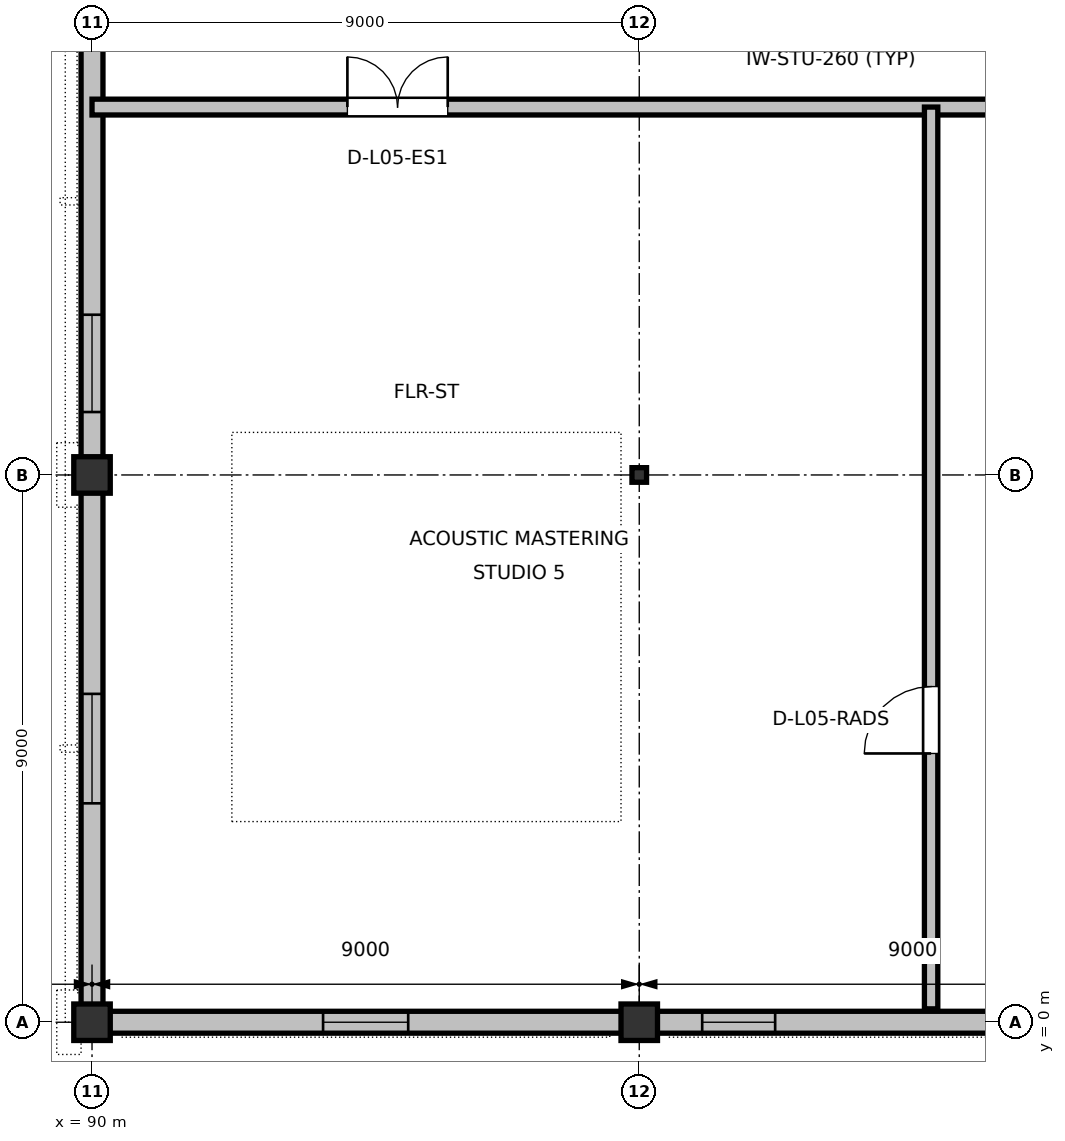
"""IFC4 building model, lengths in metres.
Left out: names, types, materials, properties, quantities, classifications, styles, units other than length and angle.
Written with IfcOpenShell. Run it as: python <this file> out.ifc"""

import sys

from ifc_helpers import new_model, si_unit, direction, frame, frame_2d, origin, origin_2d, place, context, subcontext, project, spatial, rectangle, i_section, extrude, element, fill, save


model = new_model("IFC4")
c1 = context("Model", 3, precision=1e-05, world=origin(), true_north=direction((0.0, 1.0)))
c2 = subcontext(c1, "Body", "Model", "MODEL_VIEW")
j1 = project(units=[si_unit("LENGTHUNIT", "METRE"), si_unit("PLANEANGLEUNIT", "RADIAN")], contexts=[c1])
p1 = place(None, origin())
s1 = spatial("IfcSite", under=j1, at=p1, CompositionType="ELEMENT")
p2 = place(p1, origin())
s2 = spatial("IfcBuilding", under=s1, at=p2, CompositionType="ELEMENT")
p3 = place(p2, frame((0.0, 0.0, 23.4)))
s3 = spatial("IfcBuildingStorey", under=s2, at=p3, CompositionType="ELEMENT", Elevation=23.4)
for number, where, z_axis, x_axis in (
    (1, (90.0, 0.0, 0.0), (0.0, 0.0, 1.0), (1.0, 0.0, 0.0)),
    (2, (90.0, 9.0, 0.0), (0.0, 0.0, 1.0), (1.0, 0.0, 0.0)),
    (3, (99.0, 0.0, 0.0), (0.0, 0.0, 1.0), (1.0, 0.0, 0.0)),
):
    element("IfcColumn", number, at=place(p3, frame(where, z_axis=z_axis, x_axis=x_axis)), inside=s3, PredefinedType="COLUMN", context=c2, shape_type="SweptSolid", body=[
        extrude(rectangle(XDim=0.6, YDim=0.6, at=origin_2d()), origin(), (0.0, 0.0, 1.0), 4.2),
    ])
p4 = place(p3, frame((99.0, 9.0, 0.0), z_axis=(0.0, 0.0, 1.0), x_axis=(1.0, 0.0, 0.0)))
e4 = element("IfcColumn", 4, at=p4, inside=s3, PredefinedType="COLUMN", context=c2, shape_type="SweptSolid", body=[
    extrude(i_section(OverallWidth=0.24, OverallDepth=0.24, WebThickness=0.01, FlangeThickness=0.017, at=origin_2d()), origin(), (0.0, 0.0, 1.0), 4.2),
])
p5 = place(p3, frame((90.0, 8.715, 0.0), z_axis=(0.0, 0.0, 1.0), x_axis=(0.0, -1.0, 0.0)))
e5 = element("IfcWall", 5, at=p5, inside=s3, PredefinedType="STANDARD", context=c2, shape_type="SweptSolid", body=[
    extrude(rectangle(XDim=8.43, YDim=0.36, at=frame_2d((4.215, 0.0))), origin(), (0.0, 0.0, 1.0), 3.735),
])
p6 = place(p5, frame((3.315, 0.0, 0.9)))
e6 = element("IfcOpeningElement", 6, at=p6, cuts=e5, PredefinedType="OPENING", context=c2, shape_type="SweptSolid", body=[
    extrude(rectangle(XDim=1.8, YDim=1.55, at=frame_2d((0.9, 0.775))), frame((0.0, 0.19, 0.0), z_axis=(0.0, -1.0, 0.0), x_axis=(1.0, 0.0, 0.0)), (0.0, 0.0, 1.0), 0.38),
])
p7 = place(p3, frame((90.0, 17.715, 0.0), z_axis=(0.0, 0.0, 1.0), x_axis=(0.0, -1.0, 0.0)))
e7 = element("IfcWall", 7, at=p7, inside=s3, PredefinedType="STANDARD", context=c2, shape_type="SweptSolid", body=[
    extrude(rectangle(XDim=8.43, YDim=0.36, at=frame_2d((4.215, 0.0))), origin(), (0.0, 0.0, 1.0), 3.735),
])
p8 = place(p7, frame((6.08, 0.0, 0.9)))
e8 = element("IfcOpeningElement", 8, at=p8, cuts=e7, PredefinedType="OPENING", context=c2, shape_type="SweptSolid", body=[
    extrude(rectangle(XDim=1.6, YDim=1.5, at=frame_2d((0.8, 0.75))), frame((0.0, 0.19, 0.0), z_axis=(0.0, -1.0, 0.0), x_axis=(1.0, 0.0, 0.0)), (0.0, 0.0, 1.0), 0.38),
])
p9 = place(p3, frame((90.285, 0.0, 0.0), z_axis=(0.0, 0.0, 1.0), x_axis=(1.0, 0.0, 0.0)))
e9 = element("IfcWall", 9, at=p9, inside=s3, PredefinedType="STANDARD", context=c2, shape_type="SweptSolid", body=[
    extrude(rectangle(XDim=8.43, YDim=0.36, at=frame_2d((4.215, 0.0))), origin(), (0.0, 0.0, 1.0), 3.735),
])
p10 = place(p9, frame((3.515, 0.0, 0.9)))
e10 = element("IfcOpeningElement", 10, at=p10, cuts=e9, PredefinedType="OPENING", context=c2, shape_type="SweptSolid", body=[
    extrude(rectangle(XDim=1.4, YDim=1.45, at=frame_2d((0.7, 0.725))), frame((0.0, 0.19, 0.0), z_axis=(0.0, -1.0, 0.0), x_axis=(1.0, 0.0, 0.0)), (0.0, 0.0, 1.0), 0.38),
])
p11 = place(p3, frame((99.285, 0.0, 0.0), z_axis=(0.0, 0.0, 1.0), x_axis=(1.0, 0.0, 0.0)))
e11 = element("IfcWall", 11, at=p11, inside=s3, PredefinedType="STANDARD", context=c2, shape_type="SweptSolid", body=[
    extrude(rectangle(XDim=8.43, YDim=0.36, at=frame_2d((4.215, 0.0))), origin(), (0.0, 0.0, 1.0), 3.735),
])
p12 = place(p11, frame((0.75, 0.0, 0.9)))
e12 = element("IfcOpeningElement", 12, at=p12, cuts=e11, PredefinedType="OPENING", context=c2, shape_type="SweptSolid", body=[
    extrude(rectangle(XDim=1.2, YDim=1.4, at=frame_2d((0.6, 0.7))), frame((0.0, 0.19, 0.0), z_axis=(0.0, -1.0, 0.0), x_axis=(1.0, 0.0, 0.0)), (0.0, 0.0, 1.0), 0.38),
])
p13 = place(p3, frame((90.0, 15.05, 0.0), z_axis=(0.0, 0.0, 1.0), x_axis=(1.0, 0.0, 0.0)))
e13 = element("IfcWall", 13, at=p13, inside=s3, PredefinedType="PARTITIONING", context=c2, shape_type="SweptSolid", body=[
    extrude(rectangle(XDim=24.3, YDim=0.26, at=frame_2d((12.15, 0.0))), origin(), (0.0, 0.0, 1.0), 3.725),
])
p14 = place(p13, frame((4.2, 0.0, 0.0)))
e14 = element("IfcOpeningElement", 14, at=p14, cuts=e13, PredefinedType="OPENING", context=c2, shape_type="SweptSolid", body=[
    extrude(rectangle(XDim=1.65, YDim=2.25, at=frame_2d((0.825, 1.125))), frame((0.0, 0.14, 0.0), z_axis=(0.0, -1.0, 0.0), x_axis=(1.0, 0.0, 0.0)), (0.0, 0.0, 1.0), 0.28),
])
p15 = place(p13, frame((16.5, 0.0, 0.0)))
e15 = element("IfcOpeningElement", 15, at=p15, cuts=e13, PredefinedType="OPENING", context=c2, shape_type="SweptSolid", body=[
    extrude(rectangle(XDim=1.45, YDim=2.22, at=frame_2d((0.725, 1.11))), frame((0.0, 0.14, 0.0), z_axis=(0.0, -1.0, 0.0), x_axis=(1.0, 0.0, 0.0)), (0.0, 0.0, 1.0), 0.28),
])
p16 = place(p3, frame((103.8, 0.22, 0.0), z_axis=(0.0, 0.0, 1.0), x_axis=(0.0, 1.0, 0.0)))
e16 = element("IfcWall", 16, at=p16, inside=s3, PredefinedType="PARTITIONING", context=c2, shape_type="SweptSolid", body=[
    extrude(rectangle(XDim=14.83, YDim=0.22, at=frame_2d((7.415, 0.0))), origin(), (0.0, 0.0, 1.0), 3.96),
])
p17 = place(p16, frame((4.2, 0.0, 0.0)))
e17 = element("IfcOpeningElement", 17, at=p17, cuts=e16, PredefinedType="OPENING", context=c2, shape_type="SweptSolid", body=[
    extrude(rectangle(XDim=1.1, YDim=2.16, at=frame_2d((0.55, 1.08))), frame((0.0, 0.12, 0.0), z_axis=(0.0, -1.0, 0.0), x_axis=(1.0, 0.0, 0.0)), (0.0, 0.0, 1.0), 0.24),
])
p18 = place(p6, origin())
e18 = element("IfcWindow", 18, at=p18, inside=s3, PartitioningType="SINGLE_PANEL", PredefinedType="WINDOW", context=c2, shape_type="SweptSolid", body=[
    extrude(rectangle(XDim=1.8, YDim=1.55, at=frame_2d((0.9, 0.775))), frame((0.0, 0.03, 0.0), z_axis=(0.0, -1.0, 0.0), x_axis=(1.0, 0.0, 0.0)), (0.0, 0.0, 1.0), 0.06),
])
fill(e6, e18)
p19 = place(p8, origin())
e19 = element("IfcWindow", 19, at=p19, inside=s3, PartitioningType="SINGLE_PANEL", PredefinedType="WINDOW", context=c2, shape_type="SweptSolid", body=[
    extrude(rectangle(XDim=1.6, YDim=1.5, at=frame_2d((0.8, 0.75))), frame((0.0, 0.03, 0.0), z_axis=(0.0, -1.0, 0.0), x_axis=(1.0, 0.0, 0.0)), (0.0, 0.0, 1.0), 0.06),
])
fill(e8, e19)
p20 = place(p10, origin())
e20 = element("IfcWindow", 20, at=p20, inside=s3, PartitioningType="SINGLE_PANEL", PredefinedType="WINDOW", context=c2, shape_type="SweptSolid", body=[
    extrude(rectangle(XDim=1.4, YDim=1.45, at=frame_2d((0.7, 0.725))), frame((0.0, 0.03, 0.0), z_axis=(0.0, -1.0, 0.0), x_axis=(1.0, 0.0, 0.0)), (0.0, 0.0, 1.0), 0.06),
])
fill(e10, e20)
p21 = place(p12, origin())
e21 = element("IfcWindow", 21, at=p21, inside=s3, PartitioningType="SINGLE_PANEL", PredefinedType="WINDOW", context=c2, shape_type="SweptSolid", body=[
    extrude(rectangle(XDim=1.2, YDim=1.4, at=frame_2d((0.6, 0.7))), frame((0.0, 0.03, 0.0), z_axis=(0.0, -1.0, 0.0), x_axis=(1.0, 0.0, 0.0)), (0.0, 0.0, 1.0), 0.06),
])
fill(e12, e21)
p22 = place(p14, origin())
e22 = element("IfcDoor", 22, at=p22, inside=s3, OperationType="DOUBLE_DOOR_SINGLE_SWING", PredefinedType="DOOR", context=c2, shape_type="SweptSolid", body=[
    extrude(rectangle(XDim=1.65, YDim=2.25, at=frame_2d((0.825, 1.125))), frame((0.0, 0.025, 0.0), z_axis=(0.0, -1.0, 0.0), x_axis=(1.0, 0.0, 0.0)), (0.0, 0.0, 1.0), 0.05),
])
fill(e14, e22)
p23 = place(p17, origin())
e23 = element("IfcDoor", 23, at=p23, inside=s3, OperationType="SINGLE_SWING_LEFT", PredefinedType="DOOR", context=c2, shape_type="SweptSolid", body=[
    extrude(rectangle(XDim=1.1, YDim=2.16, at=frame_2d((0.55, 1.08))), frame((0.0, 0.025, 0.0), z_axis=(0.0, -1.0, 0.0), x_axis=(1.0, 0.0, 0.0)), (0.0, 0.0, 1.0), 0.05),
])
fill(e17, e23)
save(model, sys.argv[1])
